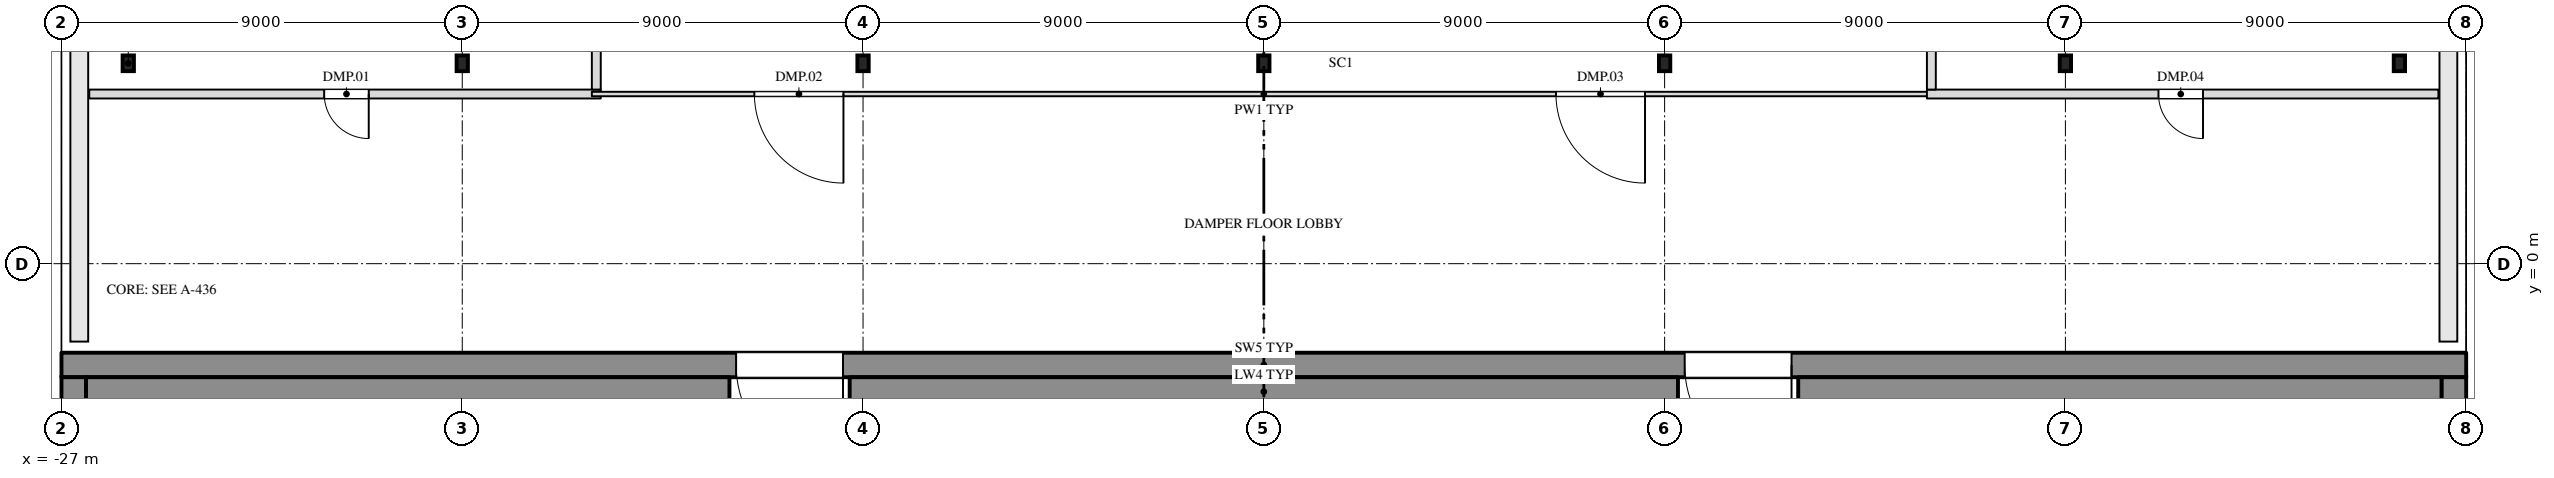
"""IFC4 building model, lengths in metres.
Left out: names, types, materials, properties, quantities, classifications, styles, units other than length and angle.
Written with IfcOpenShell. Run it as: python <this file> out.ifc"""

import sys

from ifc_helpers import new_model, si_unit, direction, frame, frame_2d, origin, origin_2d, place, context, subcontext, project, spatial, polyline, rectangle, i_section, outline, extrude, element, fill, save


model = new_model("IFC4")
c1 = context("Model", 3, precision=1e-05, world=origin(), true_north=direction((0.0, 1.0)))
c2 = subcontext(c1, "Body", "Model", "MODEL_VIEW")
j1 = project(units=[si_unit("LENGTHUNIT", "METRE"), si_unit("PLANEANGLEUNIT", "RADIAN")], contexts=[c1])
p1 = place(None, origin())
s1 = spatial("IfcSite", under=j1, at=p1, CompositionType="ELEMENT")
p2 = place(p1, origin())
s2 = spatial("IfcBuilding", under=s1, at=p2, CompositionType="ELEMENT")
p3 = place(p2, frame((0.0, 0.0, 296.5)))
s3 = spatial("IfcBuildingStorey", under=s2, at=p3, CompositionType="ELEMENT", Elevation=296.5)
for number, where, z_axis, x_axis in (
    (1, (-25.5, 4.5, 0.0), (0.0, 0.0, 1.0), (1.0, 0.0, 0.0)),
    (2, (-18.0, 4.5, 0.0), (0.0, 0.0, 1.0), (1.0, 0.0, 0.0)),
    (3, (-9.0, 4.5, 0.0), (0.0, 0.0, 1.0), (1.0, 0.0, 0.0)),
    (4, (0.0, 4.5, 0.0), (0.0, 0.0, 1.0), (1.0, 0.0, 0.0)),
    (5, (9.0, 4.5, 0.0), (0.0, 0.0, 1.0), (1.0, 0.0, 0.0)),
    (6, (18.0, 4.5, 0.0), (0.0, 0.0, 1.0), (1.0, 0.0, 0.0)),
    (7, (25.5, 4.5, 0.0), (0.0, 0.0, 1.0), (1.0, 0.0, 0.0)),
):
    element("IfcColumn", number, at=place(p3, frame(where, z_axis=z_axis, x_axis=x_axis)), inside=s3, PredefinedType="COLUMN", context=c2, shape_type="SweptSolid", body=[
        extrude(i_section(OverallWidth=0.254, OverallDepth=0.353, WebThickness=0.01, FlangeThickness=0.016, at=origin_2d()), origin(), (0.0, 0.0, 1.0), 9.0),
    ])
p4 = place(p3, frame((-27.0, -2.275, 0.0), z_axis=(0.0, 0.0, 1.0), x_axis=(1.0, 0.0, 0.0)))
e8 = element("IfcWall", 8, at=p4, inside=s3, PredefinedType="SHEAR", context=c2, shape_type="SweptSolid", body=[
    extrude(rectangle(XDim=54.0, YDim=0.55, at=frame_2d((27.0, 0.0))), origin(), (0.0, 0.0, 1.0), 8.65),
])
p5 = place(p4, frame((15.15, 0.0, 0.0)))
e9 = element("IfcOpeningElement", 9, at=p5, cuts=e8, PredefinedType="OPENING", context=c2, shape_type="SweptSolid", body=[
    extrude(rectangle(XDim=2.4, YDim=2.1, at=frame_2d((1.2, 1.05))), frame((0.0, 0.287, 0.0), z_axis=(0.0, -1.0, 0.0), x_axis=(1.0, 0.0, 0.0)), (0.0, 0.0, 1.0), 0.574),
])
p6 = place(p4, frame((36.45, 0.0, 0.0)))
e10 = element("IfcOpeningElement", 10, at=p6, cuts=e8, PredefinedType="OPENING", context=c2, shape_type="SweptSolid", body=[
    extrude(rectangle(XDim=2.4, YDim=2.1, at=frame_2d((1.2, 1.05))), frame((0.0, 0.287, 0.0), z_axis=(0.0, -1.0, 0.0), x_axis=(1.0, 0.0, 0.0)), (0.0, 0.0, 1.0), 0.574),
])
p7 = place(p3, origin())
e11 = element("IfcWall", 11, at=p7, inside=s3, PredefinedType="SHEAR", context=c2, shape_type="SweptSolid", body=[
    extrude(outline(polyline([(-26.45, -2.55), (-26.45, -12.648), (-26.598, -12.5), (-27.0, -11.0), (-27.0, -2.55), (-26.45, -2.55)])), origin(), (0.0, 0.0, 1.0), 8.65),
])
p8 = place(p3, origin())
e12 = element("IfcWall", 12, at=p8, inside=s3, PredefinedType="SHEAR", context=c2, shape_type="SweptSolid", body=[
    extrude(outline(polyline([(27.0, -11.0), (26.598, -12.5), (26.45, -12.648), (26.45, -2.55), (27.0, -2.55), (27.0, -11.0)])), origin(), (0.0, 0.0, 1.0), 8.65),
])
p9 = place(p3, frame((-26.45, -2.875, 0.0), z_axis=(0.0, 0.0, 1.0), x_axis=(1.0, 0.0, 0.0)))
e13 = element("IfcWall", 13, at=p9, inside=s3, PredefinedType="SHEAR", context=c2, shape_type="SweptSolid", body=[
    extrude(rectangle(XDim=14.45, YDim=0.65, at=frame_2d((7.225, 0.0))), origin(), (0.0, 0.0, 1.0), 8.65),
])
p10 = place(p3, frame((-9.3, -2.875, 0.0), z_axis=(0.0, 0.0, 1.0), x_axis=(1.0, 0.0, 0.0)))
e14 = element("IfcWall", 14, at=p10, inside=s3, PredefinedType="SHEAR", context=c2, shape_type="SweptSolid", body=[
    extrude(rectangle(XDim=18.6, YDim=0.65, at=frame_2d((9.3, 0.0))), origin(), (0.0, 0.0, 1.0), 8.65),
])
p11 = place(p3, frame((12.0, -2.875, 0.0), z_axis=(0.0, 0.0, 1.0), x_axis=(1.0, 0.0, 0.0)))
e15 = element("IfcWall", 15, at=p11, inside=s3, PredefinedType="SHEAR", context=c2, shape_type="SweptSolid", body=[
    extrude(rectangle(XDim=14.45, YDim=0.65, at=frame_2d((7.225, 0.0))), origin(), (0.0, 0.0, 1.0), 8.65),
])
p12 = place(p3, frame((-26.376, 3.81, 0.0), z_axis=(0.0, 0.0, 1.0), x_axis=(1.0, 0.0, 0.0)))
e16 = element("IfcWall", 16, at=p12, inside=s3, PredefinedType="PARTITIONING", context=c2, shape_type="SweptSolid", body=[
    extrude(rectangle(XDim=11.486, YDim=0.2, at=frame_2d((5.743, 0.0))), origin(), (0.0, 0.0, 1.0), 8.65),
])
p13 = place(p12, frame((5.276, 0.0, 0.0)))
e17 = element("IfcOpeningElement", 17, at=p13, cuts=e16, PredefinedType="OPENING", context=c2, shape_type="SweptSolid", body=[
    extrude(rectangle(XDim=1.0, YDim=2.1, at=frame_2d((0.5, 1.05))), frame((0.0, 0.112, 0.0), z_axis=(0.0, -1.0, 0.0), x_axis=(1.0, 0.0, 0.0)), (0.0, 0.0, 1.0), 0.224),
])
p14 = place(p3, frame((-15.09, 3.81, 0.0), z_axis=(0.0, 0.0, 1.0), x_axis=(1.0, 0.0, 0.0)))
e18 = element("IfcWall", 18, at=p14, inside=s3, PredefinedType="PARTITIONING", context=c2, shape_type="SweptSolid", body=[
    extrude(rectangle(XDim=30.18, YDim=0.1, at=frame_2d((15.09, 0.0))), origin(), (0.0, 0.0, 1.0), 8.65),
])
p15 = place(p14, frame((3.65, 0.0, 0.0)))
e19 = element("IfcOpeningElement", 19, at=p15, cuts=e18, PredefinedType="OPENING", context=c2, shape_type="SweptSolid", body=[
    extrude(rectangle(XDim=2.0, YDim=2.4, at=frame_2d((1.0, 1.2))), frame((0.0, 0.062, 0.0), z_axis=(0.0, -1.0, 0.0), x_axis=(1.0, 0.0, 0.0)), (0.0, 0.0, 1.0), 0.124),
])
p16 = place(p14, frame((21.65, 0.0, 0.0)))
e20 = element("IfcOpeningElement", 20, at=p16, cuts=e18, PredefinedType="OPENING", context=c2, shape_type="SweptSolid", body=[
    extrude(rectangle(XDim=2.0, YDim=2.4, at=frame_2d((1.0, 1.2))), frame((0.0, 0.062, 0.0), z_axis=(0.0, -1.0, 0.0), x_axis=(1.0, 0.0, 0.0)), (0.0, 0.0, 1.0), 0.124),
])
p17 = place(p3, frame((-14.99, 3.91, 0.0), z_axis=(0.0, 0.0, 1.0), x_axis=(0.0, 1.0, 0.0)))
e21 = element("IfcWall", 21, at=p17, inside=s3, PredefinedType="PARTITIONING", context=c2, shape_type="SweptSolid", body=[
    extrude(rectangle(XDim=32.466, YDim=0.2, at=frame_2d((16.233, 0.0))), origin(), (0.0, 0.0, 1.0), 8.65),
])
p18 = place(p17, frame((19.98, 0.0, 0.0)))
e22 = element("IfcOpeningElement", 22, at=p18, cuts=e21, PredefinedType="OPENING", context=c2, shape_type="SweptSolid", body=[
    extrude(rectangle(XDim=1.0, YDim=2.1, at=frame_2d((0.5, 1.05))), frame((0.0, 0.112, 0.0), z_axis=(0.0, -1.0, 0.0), x_axis=(1.0, 0.0, 0.0)), (0.0, 0.0, 1.0), 0.224),
])
p19 = place(p3, frame((14.89, 3.81, 0.0), z_axis=(0.0, 0.0, 1.0), x_axis=(1.0, 0.0, 0.0)))
e23 = element("IfcWall", 23, at=p19, inside=s3, PredefinedType="PARTITIONING", context=c2, shape_type="SweptSolid", body=[
    extrude(rectangle(XDim=11.486, YDim=0.2, at=frame_2d((5.743, 0.0))), origin(), (0.0, 0.0, 1.0), 8.65),
])
p20 = place(p19, frame((5.2, 0.0, 0.0)))
e24 = element("IfcOpeningElement", 24, at=p20, cuts=e23, PredefinedType="OPENING", context=c2, shape_type="SweptSolid", body=[
    extrude(rectangle(XDim=1.0, YDim=2.1, at=frame_2d((0.5, 1.05))), frame((0.0, 0.112, 0.0), z_axis=(0.0, -1.0, 0.0), x_axis=(1.0, 0.0, 0.0)), (0.0, 0.0, 1.0), 0.224),
])
p21 = place(p3, frame((14.99, 3.91, 0.0), z_axis=(0.0, 0.0, 1.0), x_axis=(0.0, 1.0, 0.0)))
e25 = element("IfcWall", 25, at=p21, inside=s3, PredefinedType="PARTITIONING", context=c2, shape_type="SweptSolid", body=[
    extrude(rectangle(XDim=8.53, YDim=0.2, at=frame_2d((4.265, 0.0))), origin(), (0.0, 0.0, 1.0), 8.65),
])
p22 = place(p13, origin())
e26 = element("IfcDoor", 26, at=p22, inside=s3, OperationType="SINGLE_SWING_LEFT", PredefinedType="DOOR", context=c2, shape_type="SweptSolid", body=[
    extrude(rectangle(XDim=1.0, YDim=2.1, at=frame_2d((0.5, 1.05))), frame((0.0, 0.025, 0.0), z_axis=(0.0, -1.0, 0.0), x_axis=(1.0, 0.0, 0.0)), (0.0, 0.0, 1.0), 0.05),
])
fill(e17, e26)
p23 = place(p15, origin())
e27 = element("IfcDoor", 27, at=p23, inside=s3, OperationType="DOUBLE_DOOR_SINGLE_SWING", PredefinedType="DOOR", context=c2, shape_type="SweptSolid", body=[
    extrude(rectangle(XDim=2.0, YDim=2.4, at=frame_2d((1.0, 1.2))), frame((0.0, 0.025, 0.0), z_axis=(0.0, -1.0, 0.0), x_axis=(1.0, 0.0, 0.0)), (0.0, 0.0, 1.0), 0.05),
])
fill(e19, e27)
p24 = place(p16, origin())
e28 = element("IfcDoor", 28, at=p24, inside=s3, OperationType="DOUBLE_DOOR_SINGLE_SWING", PredefinedType="DOOR", context=c2, shape_type="SweptSolid", body=[
    extrude(rectangle(XDim=2.0, YDim=2.4, at=frame_2d((1.0, 1.2))), frame((0.0, 0.025, 0.0), z_axis=(0.0, -1.0, 0.0), x_axis=(1.0, 0.0, 0.0)), (0.0, 0.0, 1.0), 0.05),
])
fill(e20, e28)
p25 = place(p20, origin())
e29 = element("IfcDoor", 29, at=p25, inside=s3, OperationType="SINGLE_SWING_LEFT", PredefinedType="DOOR", context=c2, shape_type="SweptSolid", body=[
    extrude(rectangle(XDim=1.0, YDim=2.1, at=frame_2d((0.5, 1.05))), frame((0.0, 0.025, 0.0), z_axis=(0.0, -1.0, 0.0), x_axis=(1.0, 0.0, 0.0)), (0.0, 0.0, 1.0), 0.05),
])
fill(e24, e29)
p26 = place(p5, origin())
e30 = element("IfcDoor", 30, at=p26, inside=s3, OperationType="DOUBLE_DOOR_SINGLE_SWING", PredefinedType="DOOR", context=c2, shape_type="SweptSolid", body=[
    extrude(rectangle(XDim=2.4, YDim=2.1, at=frame_2d((1.2, 1.05))), frame((0.0, 0.025, 0.0), z_axis=(0.0, -1.0, 0.0), x_axis=(1.0, 0.0, 0.0)), (0.0, 0.0, 1.0), 0.05),
])
fill(e9, e30)
p27 = place(p6, origin())
e31 = element("IfcDoor", 31, at=p27, inside=s3, OperationType="DOUBLE_DOOR_SINGLE_SWING", PredefinedType="DOOR", context=c2, shape_type="SweptSolid", body=[
    extrude(rectangle(XDim=2.4, YDim=2.1, at=frame_2d((1.2, 1.05))), frame((0.0, 0.025, 0.0), z_axis=(0.0, -1.0, 0.0), x_axis=(1.0, 0.0, 0.0)), (0.0, 0.0, 1.0), 0.05),
])
fill(e10, e31)
save(model, sys.argv[1])
